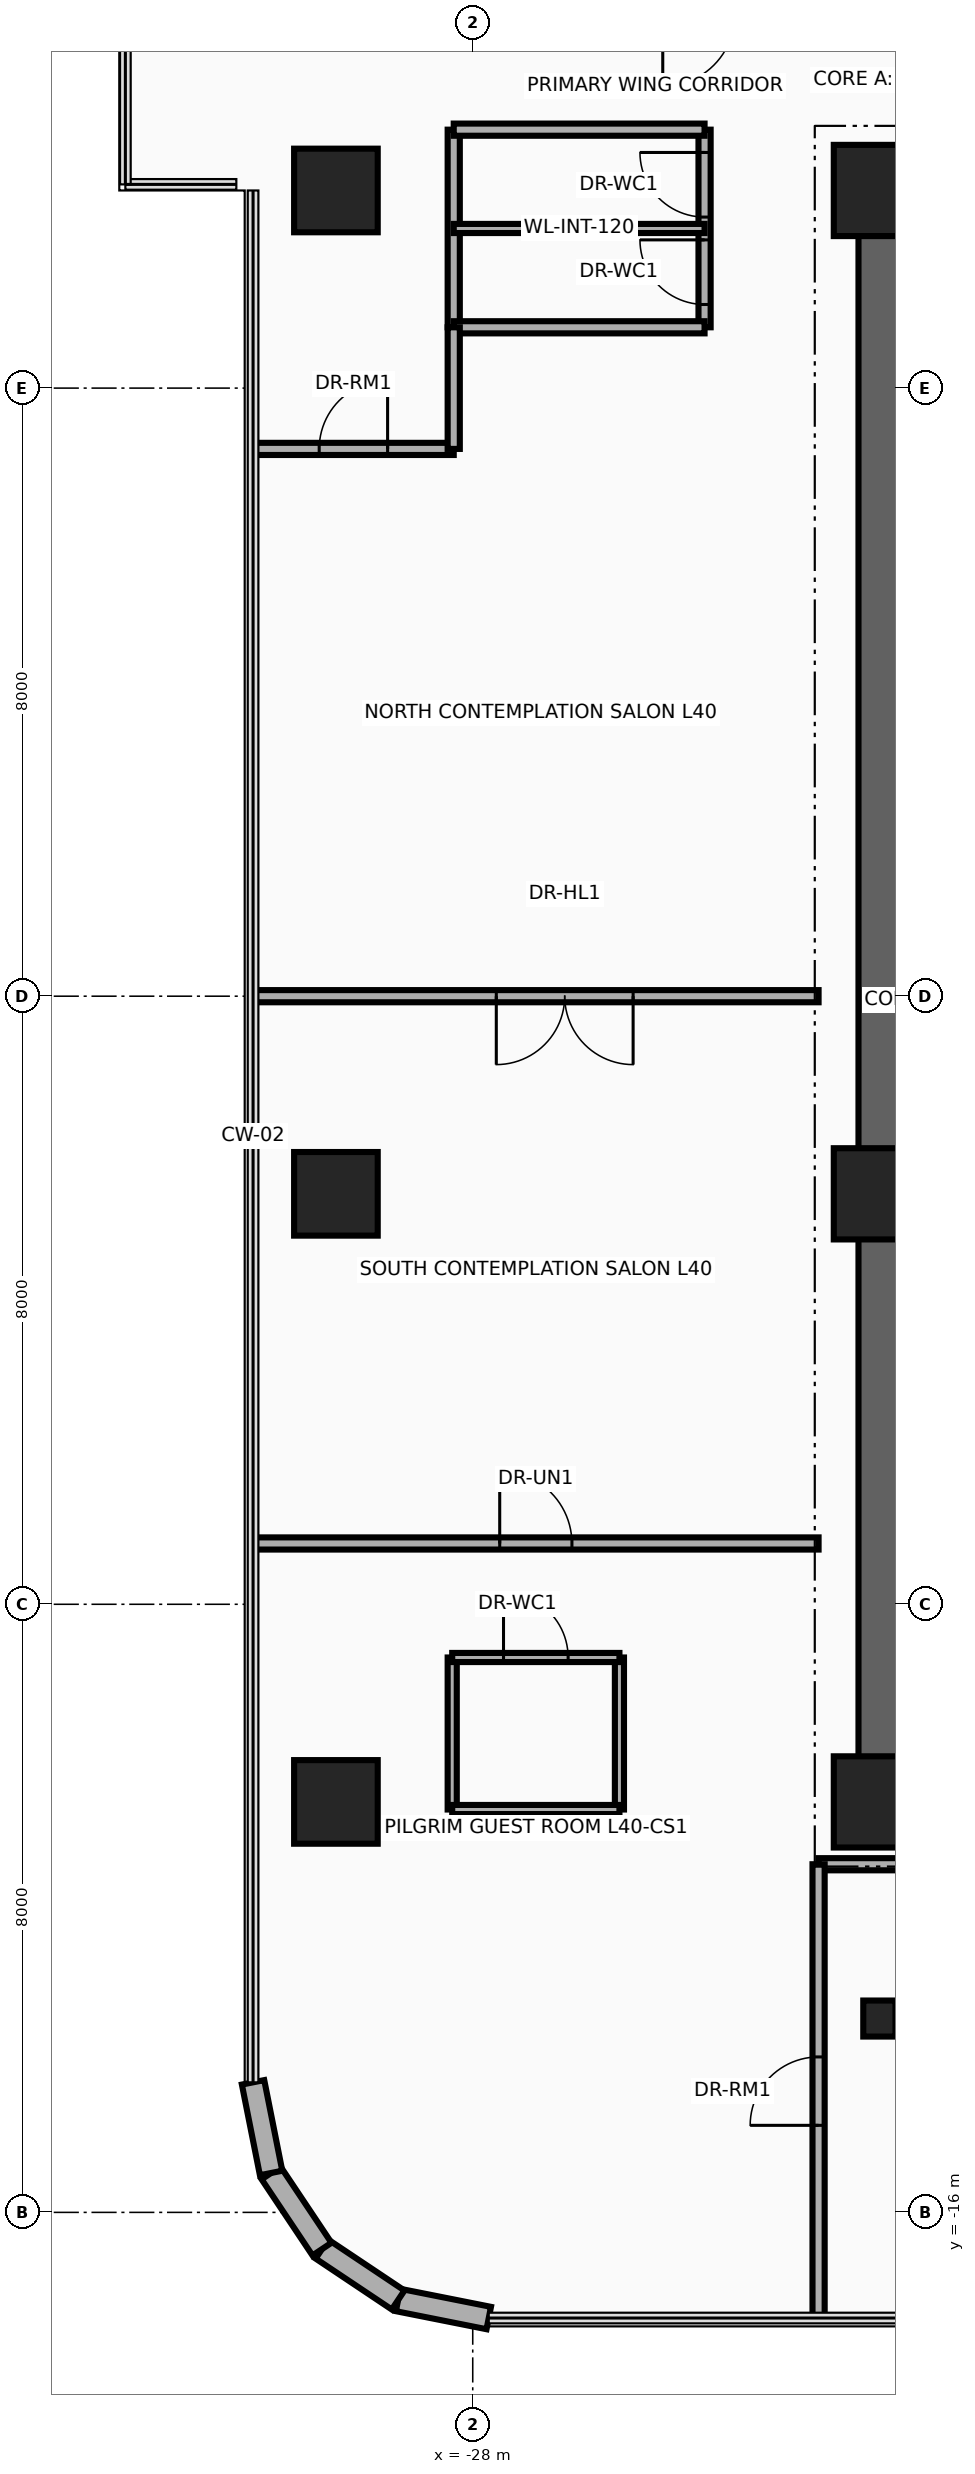
"""IFC4 building model, lengths in metres.
Left out: names, types, materials, properties, quantities, classifications, styles, units other than length and angle.
Written with IfcOpenShell. Run it as: python <this file> out.ifc"""

import sys

from ifc_helpers import new_model, si_unit, direction, frame, frame_2d, origin, origin_2d, place, context, subcontext, project, spatial, rectangle, circle, i_section, extrude, source, transform, mapped, element, fill, save


model = new_model("IFC4")
c1 = context("Model", 3, precision=1e-05, world=origin(), true_north=direction((0.0, 1.0)))
c2 = subcontext(c1, "Body", "Model", "MODEL_VIEW")
j1 = project(units=[si_unit("LENGTHUNIT", "METRE"), si_unit("PLANEANGLEUNIT", "RADIAN")], contexts=[c1])
p1 = place(None, origin())
s1 = spatial("IfcSite", under=j1, at=p1, CompositionType="ELEMENT")
p2 = place(p1, origin())
s2 = spatial("IfcBuilding", under=s1, at=p2, CompositionType="ELEMENT")
p3 = place(p2, frame((0.0, 0.0, 157.5)))
s3 = spatial("IfcBuildingStorey", under=s2, at=p3, CompositionType="ELEMENT", Elevation=157.5)
p4 = place(p3, frame((-22.65, -11.075, 0.0), z_axis=(0.0, 0.0, 1.0), x_axis=(0.0, 1.0, 0.0)))
e1 = element("IfcWall", 1, at=p4, inside=s3, PredefinedType="SHEAR", context=c2, shape_type="SweptSolid", body=[
    extrude(rectangle(XDim=22.15, YDim=0.55, at=frame_2d((11.075, 0.0))), origin(), (0.0, 0.0, 1.0), 3.46),
])
for number, where, z_axis, x_axis in (
    (2, (-22.65, 10.8, 0.0), (0.0, 0.0, 1.0), (1.0, 0.0, 0.0)),
    (3, (-22.65, -10.8, 0.0), (0.0, 0.0, 1.0), (1.0, 0.0, 0.0)),
):
    element("IfcWall", number, at=place(p3, frame(where, z_axis=z_axis, x_axis=x_axis)), inside=s3, PredefinedType="SHEAR", context=c2, shape_type="SweptSolid", body=[
        extrude(rectangle(XDim=10.25, YDim=0.55, at=frame_2d((5.125, 0.0))), origin(), (0.0, 0.0, 1.0), 3.46),
    ])
m1 = source(origin(), c2, "Body", "SweptSolid", [
    extrude(circle(Radius=0.55, at=origin_2d()), origin(), (0.0, 0.0, 1.0), 3.7),
])
p5 = place(p3, frame((-29.8, -10.6, 0.0), z_axis=(0.0, 0.0, 1.0), x_axis=(1.0, 0.0, 0.0)))
e4 = element("IfcColumn", 4, at=p5, inside=s3, PredefinedType="COLUMN", context=c2, shape_type="MappedRepresentation", body=[
    mapped(m1, transform((0.0, 0.0, 0.0), x_axis=(1.0, 0.0, 0.0), y_axis=(0.0, 1.0, 0.0), z_axis=(0.0, 0.0, 1.0), scale=1.0)),
])
m2 = source(origin(), c2, "Body", "SweptSolid", [
    extrude(rectangle(XDim=1.2, YDim=1.2, at=origin_2d()), origin(), (0.0, 0.0, 1.0), 3.7),
])
p6 = place(p3, frame((-22.65, -10.6, 0.0), z_axis=(0.0, 0.0, 1.0), x_axis=(1.0, 0.0, 0.0)))
e5 = element("IfcColumn", 5, at=p6, inside=s3, PredefinedType="COLUMN", context=c2, shape_type="MappedRepresentation", body=[
    mapped(m2, transform((0.0, 0.0, 0.0), x_axis=(1.0, 0.0, 0.0), y_axis=(0.0, 1.0, 0.0), z_axis=(0.0, 0.0, 1.0), scale=1.0)),
])
p7 = place(p3, frame((-29.8, -2.6, 0.0), z_axis=(0.0, 0.0, 1.0), x_axis=(1.0, 0.0, 0.0)))
e6 = element("IfcColumn", 6, at=p7, inside=s3, PredefinedType="COLUMN", context=c2, shape_type="MappedRepresentation", body=[
    mapped(m1, transform((0.0, 0.0, 0.0), x_axis=(1.0, 0.0, 0.0), y_axis=(0.0, 1.0, 0.0), z_axis=(0.0, 0.0, 1.0), scale=1.0)),
])
p8 = place(p3, frame((-22.65, -2.6, 0.0), z_axis=(0.0, 0.0, 1.0), x_axis=(1.0, 0.0, 0.0)))
e7 = element("IfcColumn", 7, at=p8, inside=s3, PredefinedType="COLUMN", context=c2, shape_type="MappedRepresentation", body=[
    mapped(m2, transform((0.0, 0.0, 0.0), x_axis=(1.0, 0.0, 0.0), y_axis=(0.0, 1.0, 0.0), z_axis=(0.0, 0.0, 1.0), scale=1.0)),
])
p9 = place(p3, frame((-29.8, 10.6, 0.0), z_axis=(0.0, 0.0, 1.0), x_axis=(1.0, 0.0, 0.0)))
e8 = element("IfcColumn", 8, at=p9, inside=s3, PredefinedType="COLUMN", context=c2, shape_type="MappedRepresentation", body=[
    mapped(m1, transform((0.0, 0.0, 0.0), x_axis=(1.0, 0.0, 0.0), y_axis=(0.0, 1.0, 0.0), z_axis=(0.0, 0.0, 1.0), scale=1.0)),
])
p10 = place(p3, frame((-22.65, 10.6, 0.0), z_axis=(0.0, 0.0, 1.0), x_axis=(1.0, 0.0, 0.0)))
e9 = element("IfcColumn", 9, at=p10, inside=s3, PredefinedType="COLUMN", context=c2, shape_type="MappedRepresentation", body=[
    mapped(m2, transform((0.0, 0.0, 0.0), x_axis=(1.0, 0.0, 0.0), y_axis=(0.0, 1.0, 0.0), z_axis=(0.0, 0.0, 1.0), scale=1.0)),
])
m3 = source(origin(), c2, "Body", "SweptSolid", [
    extrude(i_section(OverallWidth=0.424, OverallDepth=0.474, WebThickness=0.048, FlangeThickness=0.077, at=origin_2d()), origin(), (0.0, 0.0, 1.0), 3.7),
])
p11 = place(p3, frame((-22.65, -13.45, 0.0), z_axis=(0.0, 0.0, 1.0), x_axis=(1.0, 0.0, 0.0)))
e10 = element("IfcColumn", 10, at=p11, inside=s3, PredefinedType="COLUMN", context=c2, shape_type="MappedRepresentation", body=[
    mapped(m3, transform((0.0, 0.0, 0.0), x_axis=(1.0, 0.0, 0.0), y_axis=(0.0, 1.0, 0.0), z_axis=(0.0, 0.0, 1.0), scale=1.0)),
])
p12 = place(p3, frame((-27.789, -17.39, 0.0), z_axis=(0.0, 0.0, 1.0), x_axis=(-0.980804027463, 0.194996050505, 0.0)))
e11 = element("IfcWall", 11, at=p12, inside=s3, PredefinedType="SOLIDWALL", context=c2, shape_type="SweptSolid", body=[
    extrude(rectangle(XDim=1.216, YDim=0.3, at=frame_2d((0.608, 0.0))), origin(), (0.0, 0.0, 1.0), 3.46),
])
for number, where, z_axis, x_axis in (
    (12, (-28.982, -17.153, 0.0), (0.0, 0.0, 1.0), (-0.831, 0.556, 0.0)),
    (13, (-29.983, -16.483, 0.0), (0.0, 0.0, 1.0), (-0.556, 0.831, 0.0)),
):
    element("IfcWall", number, at=place(p3, frame(where, z_axis=z_axis, x_axis=x_axis)), inside=s3, PredefinedType="SOLIDWALL", context=c2, shape_type="SweptSolid", body=[
        extrude(rectangle(XDim=1.205, YDim=0.3, at=frame_2d((0.603, 0.0))), origin(), (0.0, 0.0, 1.0), 3.46),
    ])
p13 = place(p3, frame((-30.653, -15.482, 0.0), z_axis=(0.0, 0.0, 1.0), x_axis=(-0.194996050505, 0.980804027463, 0.0)))
e14 = element("IfcWall", 14, at=p13, inside=s3, PredefinedType="SOLIDWALL", context=c2, shape_type="SweptSolid", body=[
    extrude(rectangle(XDim=1.216, YDim=0.3, at=frame_2d((0.608, 0.0))), origin(), (0.0, 0.0, 1.0), 3.46),
])
p14 = place(p3, frame((-28.25, 8.8, 0.0), z_axis=(0.0, 0.0, 1.0), x_axis=(0.0, 1.0, 0.0)))
e15 = element("IfcWall", 15, at=p14, inside=s3, PredefinedType="PARTITIONING", context=c2, shape_type="SweptSolid", body=[
    extrude(rectangle(XDim=2.6, YDim=0.16, at=frame_2d((1.3, 0.0))), origin(), (0.0, 0.0, 1.0), 2.666),
])
p15 = place(p3, frame((-24.95, 8.8, 0.0), z_axis=(0.0, 0.0, 1.0), x_axis=(0.0, 1.0, 0.0)))
e16 = element("IfcWall", 16, at=p15, inside=s3, PredefinedType="PARTITIONING", context=c2, shape_type="SweptSolid", body=[
    extrude(rectangle(XDim=2.6, YDim=0.16, at=frame_2d((1.3, 0.0))), origin(), (0.0, 0.0, 1.0), 2.666),
])
p16 = place(p15, frame((0.3, 0.0, 0.0)))
e17 = element("IfcOpeningElement", 17, at=p16, cuts=e16, PredefinedType="OPENING", context=c2, shape_type="SweptSolid", body=[
    extrude(rectangle(XDim=0.85, YDim=2.1, at=frame_2d((0.425, 1.05))), frame((0.0, 0.095, 0.0), z_axis=(0.0, -1.0, 0.0), x_axis=(1.0, 0.0, 0.0)), (0.0, 0.0, 1.0), 0.19),
])
p17 = place(p15, frame((1.45, 0.0, 0.0)))
e18 = element("IfcOpeningElement", 18, at=p17, cuts=e16, PredefinedType="OPENING", context=c2, shape_type="SweptSolid", body=[
    extrude(rectangle(XDim=0.85, YDim=2.1, at=frame_2d((0.425, 1.05))), frame((0.0, 0.095, 0.0), z_axis=(0.0, -1.0, 0.0), x_axis=(1.0, 0.0, 0.0)), (0.0, 0.0, 1.0), 0.19),
])
for number, where, z_axis, x_axis in (
    (19, (-28.25, 8.8, 0.0), (0.0, 0.0, 1.0), (1.0, 0.0, 0.0)),
    (20, (-28.25, 11.4, 0.0), (0.0, 0.0, 1.0), (1.0, 0.0, 0.0)),
):
    element("IfcWall", number, at=place(p3, frame(where, z_axis=z_axis, x_axis=x_axis)), inside=s3, PredefinedType="PARTITIONING", context=c2, shape_type="SweptSolid", body=[
        extrude(rectangle(XDim=3.3, YDim=0.16, at=frame_2d((1.65, 0.0))), origin(), (0.0, 0.0, 1.0), 3.46),
    ])
p18 = place(p3, frame((-28.25, 10.1, 0.0), z_axis=(0.0, 0.0, 1.0), x_axis=(1.0, 0.0, 0.0)))
e21 = element("IfcWall", 21, at=p18, inside=s3, PredefinedType="PARTITIONING", context=c2, shape_type="SweptSolid", body=[
    extrude(rectangle(XDim=3.3, YDim=0.12, at=frame_2d((1.65, 0.0))), origin(), (0.0, 0.0, 1.0), 3.46),
])
p19 = place(p3, frame((-23.45, -11.42, 0.0), z_axis=(0.0, 0.0, 1.0), x_axis=(1.0, 0.0, 0.0)))
e22 = element("IfcWall", 22, at=p19, inside=s3, PredefinedType="PARTITIONING", context=c2, shape_type="SweptSolid", body=[
    extrude(rectangle(XDim=13.84, YDim=0.16, at=frame_2d((6.92, 0.0))), origin(), (0.0, 0.0, 1.0), 2.834),
])
p20 = place(p3, frame((-23.45, -17.39, 0.0), z_axis=(0.0, 0.0, 1.0), x_axis=(0.0, 1.0, 0.0)))
e23 = element("IfcWall", 23, at=p20, inside=s3, PredefinedType="PARTITIONING", context=c2, shape_type="SweptSolid", body=[
    extrude(rectangle(XDim=5.97, YDim=0.16, at=frame_2d((2.985, 0.0))), origin(), (0.0, 0.0, 1.0), 3.46),
])
p21 = place(p20, frame((2.535, 0.0, 0.0)))
e24 = element("IfcOpeningElement", 24, at=p21, cuts=e23, PredefinedType="OPENING", context=c2, shape_type="SweptSolid", body=[
    extrude(rectangle(XDim=0.9, YDim=2.1, at=frame_2d((0.45, 1.05))), frame((0.0, 0.095, 0.0), z_axis=(0.0, -1.0, 0.0), x_axis=(1.0, 0.0, 0.0)), (0.0, 0.0, 1.0), 0.19),
])
p22 = place(p3, frame((-30.89, -7.2, 0.0), z_axis=(0.0, 0.0, 1.0), x_axis=(1.0, 0.0, 0.0)))
e25 = element("IfcWall", 25, at=p22, inside=s3, PredefinedType="PARTITIONING", context=c2, shape_type="SweptSolid", body=[
    extrude(rectangle(XDim=7.44, YDim=0.16, at=frame_2d((3.72, 0.0))), origin(), (0.0, 0.0, 1.0), 2.896),
])
p23 = place(p22, frame((3.245, 0.0, 0.0)))
e26 = element("IfcOpeningElement", 26, at=p23, cuts=e25, PredefinedType="OPENING", context=c2, shape_type="SweptSolid", body=[
    extrude(rectangle(XDim=0.95, YDim=2.15, at=frame_2d((0.475, 1.075))), frame((0.0, 0.095, 0.0), z_axis=(0.0, -1.0, 0.0), x_axis=(1.0, 0.0, 0.0)), (0.0, 0.0, 1.0), 0.19),
])
p24 = place(p3, frame((-30.89, 7.2, 0.0), z_axis=(0.0, 0.0, 1.0), x_axis=(1.0, 0.0, 0.0)))
e27 = element("IfcWall", 27, at=p24, inside=s3, PredefinedType="PARTITIONING", context=c2, shape_type="SweptSolid", body=[
    extrude(rectangle(XDim=2.64, YDim=0.16, at=frame_2d((1.32, 0.0))), origin(), (0.0, 0.0, 1.0), 2.896),
])
p25 = place(p24, frame((0.87, 0.0, 0.0)))
e28 = element("IfcOpeningElement", 28, at=p25, cuts=e27, PredefinedType="OPENING", context=c2, shape_type="SweptSolid", body=[
    extrude(rectangle(XDim=0.9, YDim=2.1, at=frame_2d((0.45, 1.05))), frame((0.0, 0.095, 0.0), z_axis=(0.0, -1.0, 0.0), x_axis=(1.0, 0.0, 0.0)), (0.0, 0.0, 1.0), 0.19),
])
p26 = place(p3, frame((-28.25, 7.2, 0.0), z_axis=(0.0, 0.0, 1.0), x_axis=(0.0, 1.0, 0.0)))
e29 = element("IfcWall", 29, at=p26, inside=s3, PredefinedType="PARTITIONING", context=c2, shape_type="SweptSolid", body=[
    extrude(rectangle(XDim=1.6, YDim=0.16, at=frame_2d((0.8, 0.0))), origin(), (0.0, 0.0, 1.0), 2.988),
])
for number, where, z_axis, x_axis in (
    (30, (-28.27, -10.7, 0.0), (0.0, 0.0, 1.0), (0.0, 1.0, 0.0)),
    (31, (-26.07, -10.7, 0.0), (0.0, 0.0, 1.0), (0.0, 1.0, 0.0)),
):
    element("IfcWall", number, at=place(p3, frame(where, z_axis=z_axis, x_axis=x_axis)), inside=s3, PredefinedType="PARTITIONING", context=c2, shape_type="SweptSolid", body=[
        extrude(rectangle(XDim=2.0, YDim=0.12, at=frame_2d((1.0, 0.0))), origin(), (0.0, 0.0, 1.0), 2.666),
    ])
p27 = place(p3, frame((-28.27, -10.7, 0.0), z_axis=(0.0, 0.0, 1.0), x_axis=(1.0, 0.0, 0.0)))
e32 = element("IfcWall", 32, at=p27, inside=s3, PredefinedType="PARTITIONING", context=c2, shape_type="SweptSolid", body=[
    extrude(rectangle(XDim=2.2, YDim=0.12, at=frame_2d((1.1, 0.0))), origin(), (0.0, 0.0, 1.0), 2.666),
])
p28 = place(p3, frame((-28.27, -8.7, 0.0), z_axis=(0.0, 0.0, 1.0), x_axis=(1.0, 0.0, 0.0)))
e33 = element("IfcWall", 33, at=p28, inside=s3, PredefinedType="PARTITIONING", context=c2, shape_type="SweptSolid", body=[
    extrude(rectangle(XDim=2.2, YDim=0.12, at=frame_2d((1.1, 0.0))), origin(), (0.0, 0.0, 1.0), 3.46),
])
p29 = place(p28, frame((0.675, 0.0, 0.0)))
e34 = element("IfcOpeningElement", 34, at=p29, cuts=e33, PredefinedType="OPENING", context=c2, shape_type="SweptSolid", body=[
    extrude(rectangle(XDim=0.85, YDim=2.1, at=frame_2d((0.425, 1.05))), frame((0.0, 0.075, 0.0), z_axis=(0.0, -1.0, 0.0), x_axis=(1.0, 0.0, 0.0)), (0.0, 0.0, 1.0), 0.15),
])
p30 = place(p3, frame((-30.89, 0.0, 0.0), z_axis=(0.0, 0.0, 1.0), x_axis=(1.0, 0.0, 0.0)))
e35 = element("IfcWall", 35, at=p30, inside=s3, PredefinedType="PARTITIONING", context=c2, shape_type="SweptSolid", body=[
    extrude(rectangle(XDim=7.44, YDim=0.16, at=frame_2d((3.72, 0.0))), origin(), (0.0, 0.0, 1.0), 2.896),
])
p31 = place(p30, frame((3.2, 0.0, 0.0)))
e36 = element("IfcOpeningElement", 36, at=p31, cuts=e35, PredefinedType="OPENING", context=c2, shape_type="SweptSolid", body=[
    extrude(rectangle(XDim=1.8, YDim=2.15, at=frame_2d((0.9, 1.075))), frame((0.0, 0.095, 0.0), z_axis=(0.0, -1.0, 0.0), x_axis=(1.0, 0.0, 0.0)), (0.0, 0.0, 1.0), 0.19),
])
p32 = place(p16, origin())
e37 = element("IfcDoor", 37, at=p32, inside=s3, OperationType="SINGLE_SWING_RIGHT", PredefinedType="DOOR", context=c2, shape_type="SweptSolid", body=[
    extrude(rectangle(XDim=0.85, YDim=2.1, at=frame_2d((0.425, 1.05))), frame((0.0, 0.025, 0.0), z_axis=(0.0, -1.0, 0.0), x_axis=(1.0, 0.0, 0.0)), (0.0, 0.0, 1.0), 0.05),
])
fill(e17, e37)
p33 = place(p17, origin())
e38 = element("IfcDoor", 38, at=p33, inside=s3, OperationType="SINGLE_SWING_LEFT", PredefinedType="DOOR", context=c2, shape_type="SweptSolid", body=[
    extrude(rectangle(XDim=0.85, YDim=2.1, at=frame_2d((0.425, 1.05))), frame((0.0, 0.025, 0.0), z_axis=(0.0, -1.0, 0.0), x_axis=(1.0, 0.0, 0.0)), (0.0, 0.0, 1.0), 0.05),
])
fill(e18, e38)
p34 = place(p23, origin())
e39 = element("IfcDoor", 39, at=p34, inside=s3, OperationType="SINGLE_SWING_RIGHT", PredefinedType="DOOR", context=c2, shape_type="SweptSolid", body=[
    extrude(rectangle(XDim=0.95, YDim=2.15, at=frame_2d((0.475, 1.075))), frame((0.0, 0.025, 0.0), z_axis=(0.0, -1.0, 0.0), x_axis=(1.0, 0.0, 0.0)), (0.0, 0.0, 1.0), 0.05),
])
fill(e26, e39)
p35 = place(p29, origin())
e40 = element("IfcDoor", 40, at=p35, inside=s3, OperationType="SINGLE_SWING_LEFT", PredefinedType="DOOR", context=c2, shape_type="SweptSolid", body=[
    extrude(rectangle(XDim=0.85, YDim=2.1, at=frame_2d((0.425, 1.05))), frame((0.0, 0.025, 0.0), z_axis=(0.0, -1.0, 0.0), x_axis=(1.0, 0.0, 0.0)), (0.0, 0.0, 1.0), 0.05),
])
fill(e34, e40)
p36 = place(p25, origin())
e41 = element("IfcDoor", 41, at=p36, inside=s3, OperationType="SINGLE_SWING_RIGHT", PredefinedType="DOOR", context=c2, shape_type="SweptSolid", body=[
    extrude(rectangle(XDim=0.9, YDim=2.1, at=frame_2d((0.45, 1.05))), frame((0.0, 0.025, 0.0), z_axis=(0.0, -1.0, 0.0), x_axis=(1.0, 0.0, 0.0)), (0.0, 0.0, 1.0), 0.05),
])
fill(e28, e41)
p37 = place(p31, frame((1.8, 0.0, 0.0), z_axis=(0.0, 0.0, 1.0), x_axis=(-1.0, 0.0, 0.0)))
e42 = element("IfcDoor", 42, at=p37, inside=s3, OperationType="DOUBLE_DOOR_SINGLE_SWING", PredefinedType="DOOR", context=c2, shape_type="SweptSolid", body=[
    extrude(rectangle(XDim=1.8, YDim=2.15, at=frame_2d((0.9, 1.075))), frame((0.0, 0.025, 0.0), z_axis=(0.0, -1.0, 0.0), x_axis=(1.0, 0.0, 0.0)), (0.0, 0.0, 1.0), 0.05),
])
fill(e36, e42)
p38 = place(p21, origin())
e43 = element("IfcDoor", 43, at=p38, inside=s3, OperationType="SINGLE_SWING_RIGHT", PredefinedType="DOOR", context=c2, shape_type="SweptSolid", body=[
    extrude(rectangle(XDim=0.9, YDim=2.1, at=frame_2d((0.45, 1.05))), frame((0.0, 0.025, 0.0), z_axis=(0.0, -1.0, 0.0), x_axis=(1.0, 0.0, 0.0)), (0.0, 0.0, 1.0), 0.05),
])
fill(e24, e43)
save(model, sys.argv[1])
